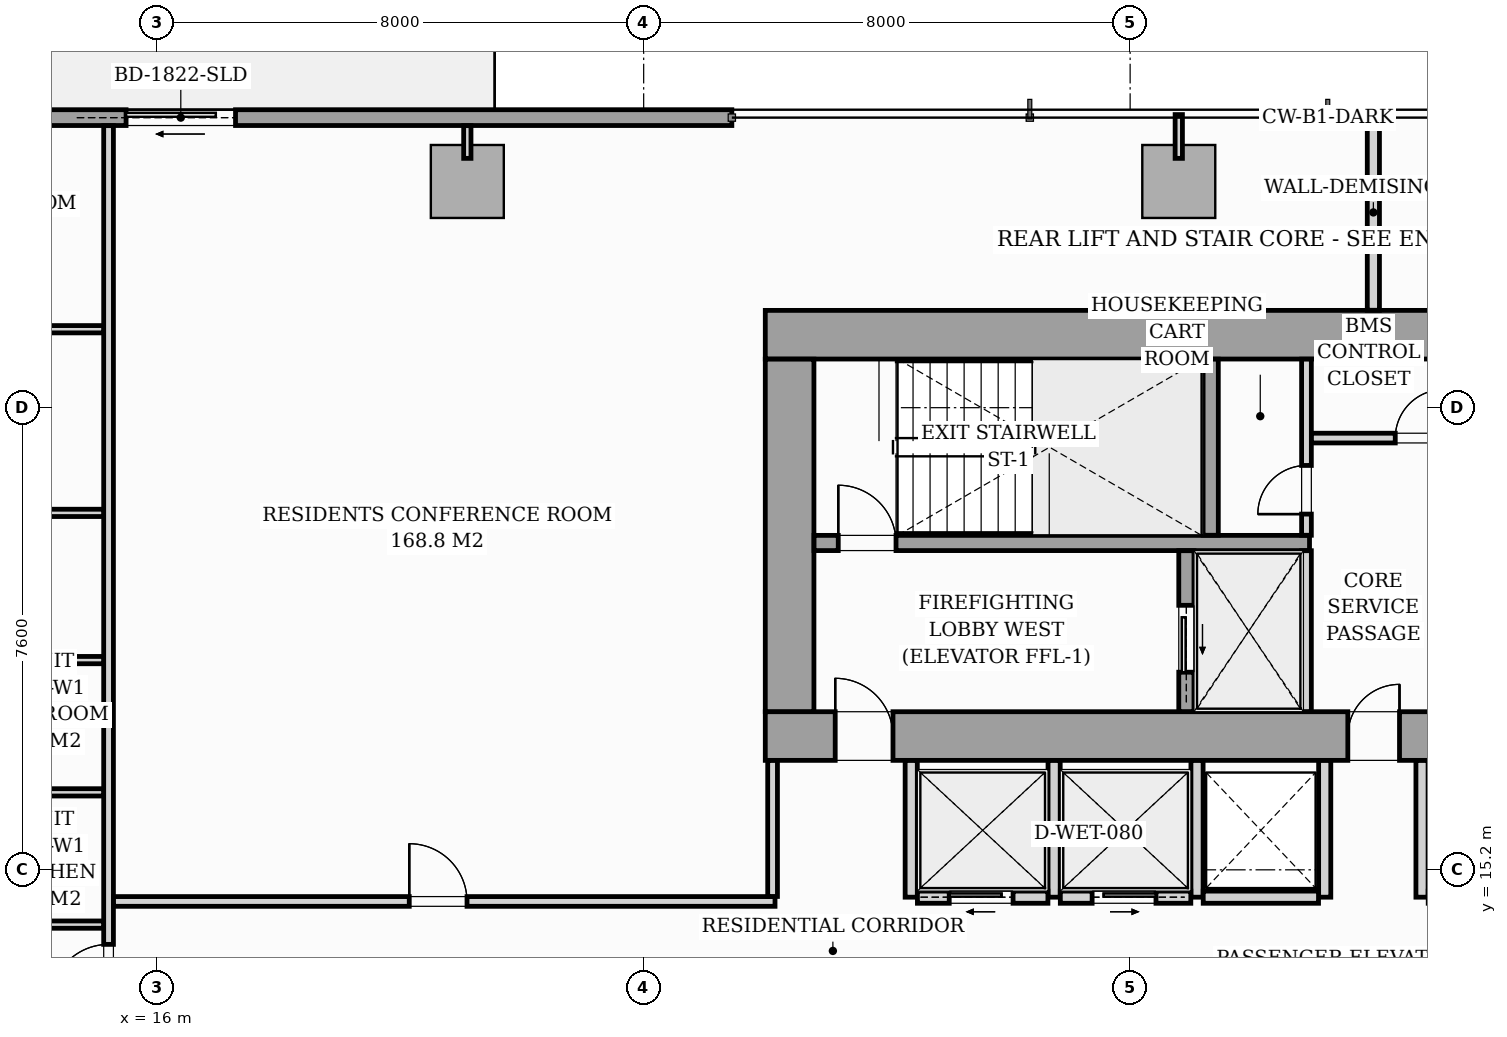
"""IFC4 building model, lengths in metres.
Left out: names, types, materials, properties, quantities, classifications, styles, units other than length and angle.
Written with IfcOpenShell. Run it as: python <this file> out.ifc"""

import sys

from ifc_helpers import new_model, si_unit, direction, frame, frame_2d, origin, origin_2d, place, context, subcontext, project, spatial, rectangle, i_section, extrude, source, transform, mapped, element, fill, save


model = new_model("IFC4")
c1 = context("Model", 3, precision=1e-05, world=origin(), true_north=direction((0.0, 1.0)))
c2 = subcontext(c1, "Body", "Model", "MODEL_VIEW")
j1 = project(units=[si_unit("LENGTHUNIT", "METRE"), si_unit("PLANEANGLEUNIT", "RADIAN")], contexts=[c1])
p1 = place(None, origin())
s1 = spatial("IfcSite", under=j1, at=p1, CompositionType="ELEMENT")
p2 = place(p1, origin())
s2 = spatial("IfcBuilding", under=s1, at=p2, CompositionType="ELEMENT")
p3 = place(p2, frame((0.0, 0.0, 48.6)))
s3 = spatial("IfcBuildingStorey", under=s2, at=p3, CompositionType="ELEMENT", Elevation=48.6)
m1 = source(origin(), c2, "Body", "SweptSolid", [
    extrude(i_section(OverallWidth=0.437, OverallDepth=0.514, WebThickness=0.061, FlangeThickness=0.097, FilletRadius=0.018, at=origin_2d()), origin(), (0.0, 0.0, 1.0), 3.196),
])
for number, where, z_axis, x_axis in (
    (1, (26.4, 17.4, 0.002), (0.0, 0.0, 1.0), (1.0, 0.0, 0.0)),
    (2, (33.12, 17.4, 0.002), (0.0, 0.0, 1.0), (1.0, 0.0, 0.0)),
    (3, (26.4, 24.0, 0.002), (0.0, 0.0, 1.0), (1.0, 0.0, 0.0)),
    (4, (33.12, 24.0, 0.002), (0.0, 0.0, 1.0), (1.0, 0.0, 0.0)),
):
    element("IfcColumn", number, at=place(p3, frame(where, z_axis=z_axis, x_axis=x_axis)), inside=s3, PredefinedType="PILASTER", context=c2, shape_type="MappedRepresentation", body=[
        mapped(m1, transform((0.0, 0.0, 0.0), scale=1.0)),
    ])
m2 = source(origin(), c2, "Body", "SweptSolid", [
    extrude(rectangle(XDim=1.2, YDim=1.2, at=origin_2d()), origin(), (0.0, 0.0, 1.0), 3.196),
])
for number, where, z_axis, x_axis in (
    (5, (21.1, 26.52, 0.002), (0.0, 0.0, 1.0), (1.0, 0.0, 0.0)),
    (6, (32.8, 26.52, 0.002), (0.0, 0.0, 1.0), (1.0, 0.0, 0.0)),
):
    element("IfcColumn", number, at=place(p3, frame(where, z_axis=z_axis, x_axis=x_axis)), inside=s3, PredefinedType="COLUMN", context=c2, shape_type="MappedRepresentation", body=[
        mapped(m2, transform((0.0, 0.0, 0.0), scale=1.0)),
    ])
p4 = place(p3, frame((8.3, 27.57, 0.0), z_axis=(0.0, 0.0, 1.0), x_axis=(1.0, 0.0, 0.0)))
e7 = element("IfcWall", 7, at=p4, inside=s3, PredefinedType="STANDARD", context=c2, shape_type="SweptSolid", body=[
    extrude(rectangle(XDim=17.15, YDim=0.26, at=frame_2d((8.575, 0.0))), origin(), (0.0, 0.0, 1.0), 2.94),
])
p5 = place(p4, frame((7.188, 0.0, 0.0)))
e8 = element("IfcOpeningElement", 8, at=p5, cuts=e7, PredefinedType="OPENING", context=c2, shape_type="SweptSolid", body=[
    extrude(rectangle(XDim=1.8, YDim=2.06, at=frame_2d((0.9, 1.03))), frame((0.0, 0.14, 0.0), z_axis=(0.0, -1.0, 0.0), x_axis=(1.0, 0.0, 0.0)), (0.0, 0.0, 1.0), 0.28),
])
p6 = place(p4, frame((2.05, 0.0, 0.65)))
e9 = element("IfcOpeningElement", 9, at=p6, cuts=e7, PredefinedType="OPENING", context=c2, shape_type="SweptSolid", body=[
    extrude(rectangle(XDim=1.6, YDim=1.5, at=frame_2d((0.8, 0.75))), frame((0.0, 0.14, 0.0), z_axis=(0.0, -1.0, 0.0), x_axis=(1.0, 0.0, 0.0)), (0.0, 0.0, 1.0), 0.28),
])
p7 = place(p3, frame((26.0, 17.4, 0.0), z_axis=(0.0, 0.0, 1.0), x_axis=(1.0, 0.0, 0.0)))
e10 = element("IfcWall", 10, at=p7, inside=s3, PredefinedType="SHEAR", context=c2, shape_type="SweptSolid", body=[
    extrude(rectangle(XDim=20.0, YDim=0.8, at=frame_2d((10.0, 0.0))), origin(), (0.0, 0.0, 1.0), 3.2),
])
p8 = place(p7, frame((1.15, 0.0, 0.0)))
e11 = element("IfcOpeningElement", 11, at=p8, cuts=e10, PredefinedType="OPENING", context=c2, shape_type="SweptSolid", body=[
    extrude(rectangle(XDim=0.95, YDim=2.06, at=frame_2d((0.475, 1.03))), frame((0.0, 0.41, 0.0), z_axis=(0.0, -1.0, 0.0), x_axis=(1.0, 0.0, 0.0)), (0.0, 0.0, 1.0), 0.82),
])
p9 = place(p7, frame((9.58, 0.0, 0.0)))
e12 = element("IfcOpeningElement", 12, at=p9, cuts=e10, PredefinedType="OPENING", context=c2, shape_type="SweptSolid", body=[
    extrude(rectangle(XDim=0.85, YDim=2.0, at=frame_2d((0.425, 1.0))), frame((0.0, 0.41, 0.0), z_axis=(0.0, -1.0, 0.0), x_axis=(1.0, 0.0, 0.0)), (0.0, 0.0, 1.0), 0.82),
])
p10 = place(p7, frame((17.75, 0.0, 0.0)))
e13 = element("IfcOpeningElement", 13, at=p10, cuts=e10, PredefinedType="OPENING", context=c2, shape_type="SweptSolid", body=[
    extrude(rectangle(XDim=0.95, YDim=2.06, at=frame_2d((0.475, 1.03))), frame((0.0, 0.41, 0.0), z_axis=(0.0, -1.0, 0.0), x_axis=(1.0, 0.0, 0.0)), (0.0, 0.0, 1.0), 0.82),
])
p11 = place(p3, frame((26.0, 24.0, 0.0), z_axis=(0.0, 0.0, 1.0), x_axis=(1.0, 0.0, 0.0)))
e14 = element("IfcWall", 14, at=p11, inside=s3, PredefinedType="SHEAR", context=c2, shape_type="SweptSolid", body=[
    extrude(rectangle(XDim=20.0, YDim=0.8, at=frame_2d((10.0, 0.0))), origin(), (0.0, 0.0, 1.0), 3.2),
])
p12 = place(p3, frame((26.4, 17.802, 0.0), z_axis=(0.0, 0.0, 1.0), x_axis=(0.0, 1.0, 0.0)))
e15 = element("IfcWall", 15, at=p12, inside=s3, PredefinedType="SHEAR", context=c2, shape_type="SweptSolid", body=[
    extrude(rectangle(XDim=5.796, YDim=0.8, at=frame_2d((2.898, 0.0))), origin(), (0.0, 0.0, 1.0), 3.2),
])
p13 = place(p3, frame((26.802, 20.575, 0.0), z_axis=(0.0, 0.0, 1.0), x_axis=(1.0, 0.0, 0.0)))
e16 = element("IfcWall", 16, at=p13, inside=s3, PredefinedType="SOLIDWALL", context=c2, shape_type="SweptSolid", body=[
    extrude(rectangle(XDim=8.148, YDim=0.25, at=frame_2d((4.074, 0.0))), origin(), (0.0, 0.0, 1.0), 3.2),
])
p14 = place(p13, frame((0.398, 0.0, 0.0)))
e17 = element("IfcOpeningElement", 17, at=p14, cuts=e16, PredefinedType="OPENING", context=c2, shape_type="SweptSolid", body=[
    extrude(rectangle(XDim=0.95, YDim=2.06, at=frame_2d((0.475, 1.03))), frame((0.0, 0.135, 0.0), z_axis=(0.0, -1.0, 0.0), x_axis=(1.0, 0.0, 0.0)), (0.0, 0.0, 1.0), 0.27),
])
p15 = place(p3, frame((33.325, 20.702, 0.0), z_axis=(0.0, 0.0, 1.0), x_axis=(0.0, 1.0, 0.0)))
e18 = element("IfcWall", 18, at=p15, inside=s3, PredefinedType="SOLIDWALL", context=c2, shape_type="SweptSolid", body=[
    extrude(rectangle(XDim=2.896, YDim=0.25, at=frame_2d((1.448, 0.0))), origin(), (0.0, 0.0, 1.0), 3.2),
])
p16 = place(p3, frame((32.925, 17.802, 0.0), z_axis=(0.0, 0.0, 1.0), x_axis=(0.0, 1.0, 0.0)))
e19 = element("IfcWall", 19, at=p16, inside=s3, PredefinedType="SOLIDWALL", context=c2, shape_type="SweptSolid", body=[
    extrude(rectangle(XDim=2.646, YDim=0.25, at=frame_2d((1.323, 0.0))), origin(), (0.0, 0.0, 1.0), 3.2),
])
p17 = place(p16, frame((0.648, 0.0, 0.0)))
e20 = element("IfcOpeningElement", 20, at=p17, cuts=e19, PredefinedType="OPENING", context=c2, shape_type="SweptSolid", body=[
    extrude(rectangle(XDim=1.1, YDim=2.08, at=frame_2d((0.55, 1.04))), frame((0.0, 0.135, 0.0), z_axis=(0.0, -1.0, 0.0), x_axis=(1.0, 0.0, 0.0)), (0.0, 0.0, 1.0), 0.27),
])
p18 = place(p3, frame((34.9, 17.802, 0.0), z_axis=(0.0, 0.0, 1.0), x_axis=(0.0, 1.0, 0.0)))
e21 = element("IfcWall", 21, at=p18, inside=s3, PredefinedType="PARTITIONING", context=c2, shape_type="SweptSolid", body=[
    extrude(rectangle(XDim=2.646, YDim=0.16, at=frame_2d((1.323, 0.0))), origin(), (0.0, 0.0, 1.0), 2.94),
])
p19 = place(p3, frame((34.9, 20.702, 0.0), z_axis=(0.0, 0.0, 1.0), x_axis=(0.0, 1.0, 0.0)))
e22 = element("IfcWall", 22, at=p19, inside=s3, PredefinedType="PARTITIONING", context=c2, shape_type="SweptSolid", body=[
    extrude(rectangle(XDim=2.896, YDim=0.16, at=frame_2d((1.448, 0.0))), origin(), (0.0, 0.0, 1.0), 2.94),
])
p20 = place(p19, frame((0.348, 0.0, 0.0)))
e23 = element("IfcOpeningElement", 23, at=p20, cuts=e22, PredefinedType="OPENING", context=c2, shape_type="SweptSolid", body=[
    extrude(rectangle(XDim=0.8, YDim=2.05, at=frame_2d((0.4, 1.025))), frame((0.0, 0.09, 0.0), z_axis=(0.0, -1.0, 0.0), x_axis=(1.0, 0.0, 0.0)), (0.0, 0.0, 1.0), 0.18),
])
p21 = place(p3, frame((34.982, 22.3, 0.0), z_axis=(0.0, 0.0, 1.0), x_axis=(1.0, 0.0, 0.0)))
e24 = element("IfcWall", 24, at=p21, inside=s3, PredefinedType="PARTITIONING", context=c2, shape_type="SweptSolid", body=[
    extrude(rectangle(XDim=3.566, YDim=0.16, at=frame_2d((1.783, 0.0))), origin(), (0.0, 0.0, 1.0), 2.94),
])
p22 = place(p21, frame((1.378, 0.0, 0.0)))
e25 = element("IfcOpeningElement", 25, at=p22, cuts=e24, PredefinedType="OPENING", context=c2, shape_type="SweptSolid", body=[
    extrude(rectangle(XDim=0.8, YDim=2.05, at=frame_2d((0.4, 1.025))), frame((0.0, 0.09, 0.0), z_axis=(0.0, -1.0, 0.0), x_axis=(1.0, 0.0, 0.0)), (0.0, 0.0, 1.0), 0.18),
])
for number, where, z_axis, x_axis in (
    (26, (28.4, 14.75, 0.0), (0.0, 0.0, 1.0), (0.0, 1.0, 0.0)),
    (27, (30.75, 14.75, 0.0), (0.0, 0.0, 1.0), (0.0, 1.0, 0.0)),
    (28, (33.1, 14.75, 0.0), (0.0, 0.0, 1.0), (0.0, 1.0, 0.0)),
):
    element("IfcWall", number, at=place(p3, frame(where, z_axis=z_axis, x_axis=x_axis)), inside=s3, PredefinedType="PARTITIONING", context=c2, shape_type="SweptSolid", body=[
        extrude(rectangle(XDim=2.248, YDim=0.2, at=frame_2d((1.124, 0.0))), origin(), (0.0, 0.0, 1.0), 2.94),
    ])
p23 = place(p3, frame((28.502, 14.75, 0.0), z_axis=(0.0, 0.0, 1.0), x_axis=(1.0, 0.0, 0.0)))
e29 = element("IfcWall", 29, at=p23, inside=s3, PredefinedType="PARTITIONING", context=c2, shape_type="SweptSolid", body=[
    extrude(rectangle(XDim=2.146, YDim=0.2, at=frame_2d((1.073, 0.0))), origin(), (0.0, 0.0, 1.0), 2.94),
])
p24 = place(p23, frame((0.523, 0.0, 0.0)))
e30 = element("IfcOpeningElement", 30, at=p24, cuts=e29, PredefinedType="OPENING", context=c2, shape_type="SweptSolid", body=[
    extrude(rectangle(XDim=1.05, YDim=2.08, at=frame_2d((0.525, 1.04))), frame((0.0, 0.11, 0.0), z_axis=(0.0, -1.0, 0.0), x_axis=(1.0, 0.0, 0.0)), (0.0, 0.0, 1.0), 0.22),
])
p25 = place(p3, frame((30.852, 14.75, 0.0), z_axis=(0.0, 0.0, 1.0), x_axis=(1.0, 0.0, 0.0)))
e31 = element("IfcWall", 31, at=p25, inside=s3, PredefinedType="PARTITIONING", context=c2, shape_type="SweptSolid", body=[
    extrude(rectangle(XDim=2.146, YDim=0.2, at=frame_2d((1.073, 0.0))), origin(), (0.0, 0.0, 1.0), 2.94),
])
p26 = place(p25, frame((0.523, 0.0, 0.0)))
e32 = element("IfcOpeningElement", 32, at=p26, cuts=e31, PredefinedType="OPENING", context=c2, shape_type="SweptSolid", body=[
    extrude(rectangle(XDim=1.05, YDim=2.08, at=frame_2d((0.525, 1.04))), frame((0.0, 0.11, 0.0), z_axis=(0.0, -1.0, 0.0), x_axis=(1.0, 0.0, 0.0)), (0.0, 0.0, 1.0), 0.22),
])
p27 = place(p3, frame((35.2, 14.75, 0.0), z_axis=(0.0, 0.0, 1.0), x_axis=(0.0, 1.0, 0.0)))
e33 = element("IfcWall", 33, at=p27, inside=s3, PredefinedType="PARTITIONING", context=c2, shape_type="SweptSolid", body=[
    extrude(rectangle(XDim=2.248, YDim=0.2, at=frame_2d((1.124, 0.0))), origin(), (0.0, 0.0, 1.0), 2.94),
])
p28 = place(p3, frame((33.202, 14.75, 0.0), z_axis=(0.0, 0.0, 1.0), x_axis=(1.0, 0.0, 0.0)))
e34 = element("IfcWall", 34, at=p28, inside=s3, PredefinedType="PARTITIONING", context=c2, shape_type="SweptSolid", body=[
    extrude(rectangle(XDim=1.896, YDim=0.2, at=frame_2d((0.948, 0.0))), origin(), (0.0, 0.0, 1.0), 2.94),
])
p29 = place(p3, frame((36.8, 14.75, 0.0), z_axis=(0.0, 0.0, 1.0), x_axis=(0.0, 1.0, 0.0)))
e35 = element("IfcWall", 35, at=p29, inside=s3, PredefinedType="PARTITIONING", context=c2, shape_type="SweptSolid", body=[
    extrude(rectangle(XDim=2.248, YDim=0.2, at=frame_2d((1.124, 0.0))), origin(), (0.0, 0.0, 1.0), 2.94),
])
p30 = place(p3, frame((15.2, 12.712, 0.0), z_axis=(0.0, 0.0, 1.0), x_axis=(0.0, 1.0, 0.0)))
e36 = element("IfcWall", 36, at=p30, inside=s3, PredefinedType="PARTITIONING", context=c2, shape_type="SweptSolid", body=[
    extrude(rectangle(XDim=14.726, YDim=0.16, at=frame_2d((7.363, 0.0))), origin(), (0.0, 0.0, 1.0), 2.94),
])
p31 = place(p30, frame((0.312, 0.0, 0.0)))
e37 = element("IfcOpeningElement", 37, at=p31, cuts=e36, PredefinedType="OPENING", context=c2, shape_type="SweptSolid", body=[
    extrude(rectangle(XDim=0.95, YDim=2.06, at=frame_2d((0.475, 1.03))), frame((0.0, 0.09, 0.0), z_axis=(0.0, -1.0, 0.0), x_axis=(1.0, 0.0, 0.0)), (0.0, 0.0, 1.0), 0.18),
])
p32 = place(p3, frame((36.0, 24.402, 0.0), z_axis=(0.0, 0.0, 1.0), x_axis=(0.0, 1.0, 0.0)))
e38 = element("IfcWall", 38, at=p32, inside=s3, PredefinedType="PARTITIONING", context=c2, shape_type="SweptSolid", body=[
    extrude(rectangle(XDim=3.218, YDim=0.2, at=frame_2d((1.609, 0.0))), origin(), (0.0, 0.0, 1.0), 2.94),
])
for number, where, z_axis, x_axis in (
    (39, (12.862, 16.474, 0.0), (0.0, 0.0, 1.0), (1.0, 0.0, 0.0)),
    (40, (12.862, 14.299, 0.0), (0.0, 0.0, 1.0), (1.0, 0.0, 0.0)),
    (41, (12.862, 18.649, 0.0), (0.0, 0.0, 1.0), (1.0, 0.0, 0.0)),
):
    element("IfcWall", number, at=place(p3, frame(where, z_axis=z_axis, x_axis=x_axis)), inside=s3, PredefinedType="PARTITIONING", context=c2, shape_type="SweptSolid", body=[
        extrude(rectangle(XDim=2.256, YDim=0.12, at=frame_2d((1.128, 0.0))), origin(), (0.0, 0.0, 1.0), 2.94),
    ])
p33 = place(p3, frame((5.88, 24.09, 0.0), z_axis=(0.0, 0.0, 1.0), x_axis=(1.0, 0.0, 0.0)))
e42 = element("IfcWall", 42, at=p33, inside=s3, PredefinedType="PARTITIONING", context=c2, shape_type="SweptSolid", body=[
    extrude(rectangle(XDim=9.238, YDim=0.12, at=frame_2d((4.619, 0.0))), origin(), (0.0, 0.0, 1.0), 2.94),
])
p34 = place(p33, frame((4.185, 0.0, 0.0)))
e43 = element("IfcOpeningElement", 43, at=p34, cuts=e42, PredefinedType="OPENING", context=c2, shape_type="SweptSolid", body=[
    extrude(rectangle(XDim=0.85, YDim=2.05, at=frame_2d((0.425, 1.025))), frame((0.0, 0.07, 0.0), z_axis=(0.0, -1.0, 0.0), x_axis=(1.0, 0.0, 0.0)), (0.0, 0.0, 1.0), 0.14),
])
p35 = place(p3, frame((5.88, 21.07, 0.0), z_axis=(0.0, 0.0, 1.0), x_axis=(1.0, 0.0, 0.0)))
e44 = element("IfcWall", 44, at=p35, inside=s3, PredefinedType="PARTITIONING", context=c2, shape_type="SweptSolid", body=[
    extrude(rectangle(XDim=9.238, YDim=0.12, at=frame_2d((4.619, 0.0))), origin(), (0.0, 0.0, 1.0), 2.94),
])
p36 = place(p35, frame((4.185, 0.0, 0.0)))
e45 = element("IfcOpeningElement", 45, at=p36, cuts=e44, PredefinedType="OPENING", context=c2, shape_type="SweptSolid", body=[
    extrude(rectangle(XDim=0.85, YDim=2.05, at=frame_2d((0.425, 1.025))), frame((0.0, 0.07, 0.0), z_axis=(0.0, -1.0, 0.0), x_axis=(1.0, 0.0, 0.0)), (0.0, 0.0, 1.0), 0.14),
])
p37 = place(p3, frame((15.282, 14.68, 0.0), z_axis=(0.0, 0.0, 1.0), x_axis=(1.0, 0.0, 0.0)))
e46 = element("IfcWall", 46, at=p37, inside=s3, PredefinedType="PARTITIONING", context=c2, shape_type="SweptSolid", body=[
    extrude(rectangle(XDim=10.878, YDim=0.16, at=frame_2d((5.439, 0.0))), origin(), (0.0, 0.0, 1.0), 2.94),
])
p38 = place(p37, frame((4.863, 0.0, 0.0)))
e47 = element("IfcOpeningElement", 47, at=p38, cuts=e46, PredefinedType="OPENING", context=c2, shape_type="SweptSolid", body=[
    extrude(rectangle(XDim=0.95, YDim=2.06, at=frame_2d((0.475, 1.03))), frame((0.0, 0.09, 0.0), z_axis=(0.0, -1.0, 0.0), x_axis=(1.0, 0.0, 0.0)), (0.0, 0.0, 1.0), 0.18),
])
p39 = place(p3, frame((26.12, 14.762, 0.0), z_axis=(0.0, 0.0, 1.0), x_axis=(0.0, 1.0, 0.0)))
e48 = element("IfcWall", 48, at=p39, inside=s3, PredefinedType="PARTITIONING", context=c2, shape_type="SweptSolid", body=[
    extrude(rectangle(XDim=2.236, YDim=0.16, at=frame_2d((1.118, 0.0))), origin(), (0.0, 0.0, 1.0), 2.94),
])
p40 = place(p3, frame((21.1, 26.9, 0.0), z_axis=(0.0, 0.0, 1.0), x_axis=(0.0, 1.0, 0.0)))
e49 = element("IfcWall", 49, at=p40, inside=s3, PredefinedType="PARTITIONING", context=c2, shape_type="SweptSolid", body=[
    extrude(rectangle(XDim=0.538, YDim=0.12, at=frame_2d((0.269, 0.0))), origin(), (0.0, 0.0, 1.0), 2.94),
])
p41 = place(p3, frame((32.8, 26.9, 0.0), z_axis=(0.0, 0.0, 1.0), x_axis=(0.0, 1.0, 0.0)))
e50 = element("IfcWall", 50, at=p41, inside=s3, PredefinedType="PARTITIONING", context=c2, shape_type="SweptSolid", body=[
    extrude(rectangle(XDim=0.72, YDim=0.12, at=frame_2d((0.36, 0.0))), origin(), (0.0, 0.0, 1.0), 2.94),
])
m3 = source(origin(), c2, "Body", "SweptSolid", [
    extrude(rectangle(XDim=1.8, YDim=2.06, at=frame_2d((0.9, 1.03))), frame((0.0, 0.025, 0.0), z_axis=(0.0, -1.0, 0.0), x_axis=(1.0, 0.0, 0.0)), (0.0, 0.0, 1.0), 0.05),
])
p42 = place(p5, origin())
e51 = element("IfcDoor", 51, at=p42, inside=s3, OperationType="SLIDING_TO_LEFT", PredefinedType="DOOR", context=c2, shape_type="MappedRepresentation", body=[
    mapped(m3, transform((0.0, 0.0, 0.0), scale=1.0)),
])
fill(e8, e51)
m4 = source(origin(), c2, "Body", "SweptSolid", [
    extrude(rectangle(XDim=0.95, YDim=2.06, at=frame_2d((0.475, 1.03))), frame((0.0, 0.025, 0.0), z_axis=(0.0, -1.0, 0.0), x_axis=(1.0, 0.0, 0.0)), (0.0, 0.0, 1.0), 0.05),
])
p43 = place(p8, origin())
e52 = element("IfcDoor", 52, at=p43, inside=s3, OperationType="SINGLE_SWING_LEFT", PredefinedType="DOOR", context=c2, shape_type="MappedRepresentation", body=[
    mapped(m4, transform((0.0, 0.0, 0.0), scale=1.0)),
])
fill(e11, e52)
m5 = source(origin(), c2, "Body", "SweptSolid", [
    extrude(rectangle(XDim=0.85, YDim=2.0, at=frame_2d((0.425, 1.0))), frame((0.0, 0.025, 0.0), z_axis=(0.0, -1.0, 0.0), x_axis=(1.0, 0.0, 0.0)), (0.0, 0.0, 1.0), 0.05),
])
p44 = place(p9, origin())
e53 = element("IfcDoor", 53, at=p44, inside=s3, OperationType="SINGLE_SWING_RIGHT", PredefinedType="DOOR", context=c2, shape_type="MappedRepresentation", body=[
    mapped(m5, transform((0.0, 0.0, 0.0), scale=1.0)),
])
fill(e12, e53)
p45 = place(p14, origin())
e54 = element("IfcDoor", 54, at=p45, inside=s3, OperationType="SINGLE_SWING_LEFT", PredefinedType="DOOR", context=c2, shape_type="MappedRepresentation", body=[
    mapped(m4, transform((0.0, 0.0, 0.0), scale=1.0)),
])
fill(e17, e54)
m6 = source(origin(), c2, "Body", "SweptSolid", [
    extrude(rectangle(XDim=1.1, YDim=2.08, at=frame_2d((0.55, 1.04))), frame((0.0, 0.025, 0.0), z_axis=(0.0, -1.0, 0.0), x_axis=(1.0, 0.0, 0.0)), (0.0, 0.0, 1.0), 0.05),
])
p46 = place(p17, origin())
e55 = element("IfcDoor", 55, at=p46, inside=s3, OperationType="SLIDING_TO_LEFT", PredefinedType="DOOR", context=c2, shape_type="MappedRepresentation", body=[
    mapped(m6, transform((0.0, 0.0, 0.0), scale=1.0)),
])
fill(e20, e55)
m7 = source(origin(), c2, "Body", "SweptSolid", [
    extrude(rectangle(XDim=0.8, YDim=2.05, at=frame_2d((0.4, 1.025))), frame((0.0, 0.025, 0.0), z_axis=(0.0, -1.0, 0.0), x_axis=(1.0, 0.0, 0.0)), (0.0, 0.0, 1.0), 0.05),
])
p47 = place(p20, origin())
e56 = element("IfcDoor", 56, at=p47, inside=s3, OperationType="SINGLE_SWING_LEFT", PredefinedType="DOOR", context=c2, shape_type="MappedRepresentation", body=[
    mapped(m7, transform((0.0, 0.0, 0.0), scale=1.0)),
])
fill(e23, e56)
p48 = place(p22, origin())
e57 = element("IfcDoor", 57, at=p48, inside=s3, OperationType="SINGLE_SWING_RIGHT", PredefinedType="DOOR", context=c2, shape_type="MappedRepresentation", body=[
    mapped(m7, transform((0.0, 0.0, 0.0), scale=1.0)),
])
fill(e25, e57)
m8 = source(origin(), c2, "Body", "SweptSolid", [
    extrude(rectangle(XDim=1.05, YDim=2.08, at=frame_2d((0.525, 1.04))), frame((0.0, 0.025, 0.0), z_axis=(0.0, -1.0, 0.0), x_axis=(1.0, 0.0, 0.0)), (0.0, 0.0, 1.0), 0.05),
])
p49 = place(p24, origin())
e58 = element("IfcDoor", 58, at=p49, inside=s3, OperationType="SLIDING_TO_LEFT", PredefinedType="DOOR", context=c2, shape_type="MappedRepresentation", body=[
    mapped(m8, transform((0.0, 0.0, 0.0), scale=1.0)),
])
fill(e30, e58)
p50 = place(p26, origin())
e59 = element("IfcDoor", 59, at=p50, inside=s3, OperationType="SLIDING_TO_RIGHT", PredefinedType="DOOR", context=c2, shape_type="MappedRepresentation", body=[
    mapped(m8, transform((0.0, 0.0, 0.0), scale=1.0)),
])
fill(e32, e59)
m9 = source(origin(), c2, "Body", "SweptSolid", [
    extrude(rectangle(XDim=0.95, YDim=2.06, at=frame_2d((0.475, 1.03))), frame((0.0, 0.025, 0.0), z_axis=(0.0, -1.0, 0.0), x_axis=(1.0, 0.0, 0.0)), (0.0, 0.0, 1.0), 0.05),
])
p51 = place(p31, origin())
e60 = element("IfcDoor", 60, at=p51, inside=s3, OperationType="SINGLE_SWING_LEFT", PredefinedType="DOOR", context=c2, shape_type="MappedRepresentation", body=[
    mapped(m9, transform((0.0, 0.0, 0.0), scale=1.0)),
])
fill(e37, e60)
p52 = place(p38, origin())
e61 = element("IfcDoor", 61, at=p52, inside=s3, OperationType="SINGLE_SWING_LEFT", PredefinedType="DOOR", context=c2, shape_type="MappedRepresentation", body=[
    mapped(m9, transform((0.0, 0.0, 0.0), scale=1.0)),
])
fill(e47, e61)
save(model, sys.argv[1])
